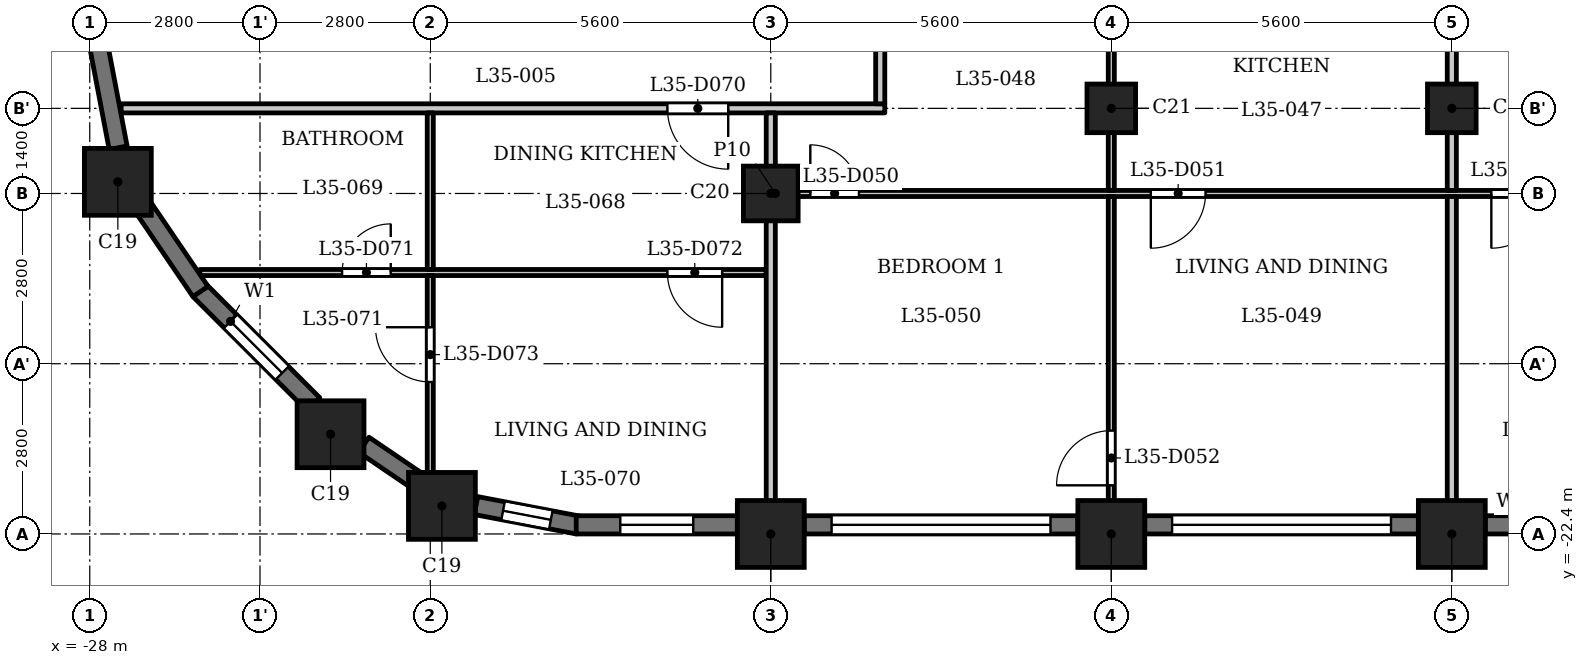
"""IFC4 building model, lengths in metres.
Left out: names, types, materials, properties, quantities, classifications, styles, units other than length and angle.
Written with IfcOpenShell. Run it as: python <this file> out.ifc"""

import sys

from ifc_helpers import new_model, si_unit, direction, frame, frame_2d, origin, origin_2d, place, context, subcontext, project, spatial, rectangle, extrude, element, fill, save


model = new_model("IFC4")
c1 = context("Model", 3, precision=1e-05, world=origin(), true_north=direction((0.0, 1.0)))
c2 = subcontext(c1, "Body", "Model", "MODEL_VIEW")
j1 = project(units=[si_unit("LENGTHUNIT", "METRE"), si_unit("PLANEANGLEUNIT", "RADIAN")], contexts=[c1])
p1 = place(None, origin())
s1 = spatial("IfcSite", under=j1, at=p1, CompositionType="ELEMENT")
p2 = place(p1, origin())
s2 = spatial("IfcBuilding", under=s1, at=p2, CompositionType="ELEMENT")
p3 = place(p2, frame((0.0, 0.0, 139.6)))
s3 = spatial("IfcBuildingStorey", under=s2, at=p3, CompositionType="ELEMENT", Elevation=139.6)
for number, where, z_axis, x_axis in (
    (1, (-22.209, -21.938, 0.0), (0.0, 0.0, 1.0), (1.0, 0.0, 0.0)),
    (2, (-16.8, -22.4, 0.0), (0.0, 0.0, 1.0), (1.0, 0.0, 0.0)),
    (3, (-11.2, -22.4, 0.0), (0.0, 0.0, 1.0), (1.0, 0.0, 0.0)),
    (4, (-5.6, -22.4, 0.0), (0.0, 0.0, 1.0), (1.0, 0.0, 0.0)),
    (5, (-27.538, -16.609, 0.0), (0.0, 0.0, 1.0), (1.0, 0.0, 0.0)),
    (6, (-24.04, -20.76, 0.0), (0.0, 0.0, 1.0), (1.0, 0.0, 0.0)),
):
    element("IfcColumn", number, at=place(p3, frame(where, z_axis=z_axis, x_axis=x_axis)), inside=s3, PredefinedType="COLUMN", context=c2, shape_type="SweptSolid", body=[
        extrude(rectangle(XDim=1.1, YDim=1.1, at=origin_2d()), origin(), (0.0, 0.0, 1.0), 3.5),
    ])
p4 = place(p3, frame((-16.8, -16.8, 0.0), z_axis=(0.0, 0.0, 1.0), x_axis=(1.0, 0.0, 0.0)))
e7 = element("IfcColumn", 7, at=p4, inside=s3, PredefinedType="COLUMN", context=c2, shape_type="SweptSolid", body=[
    extrude(rectangle(XDim=0.9, YDim=0.9, at=origin_2d()), origin(), (0.0, 0.0, 1.0), 3.5),
])
for number, where, z_axis, x_axis in (
    (8, (-11.2, -15.4, 0.0), (0.0, 0.0, 1.0), (1.0, 0.0, 0.0)),
    (9, (-5.6, -15.4, 0.0), (0.0, 0.0, 1.0), (1.0, 0.0, 0.0)),
):
    element("IfcColumn", number, at=place(p3, frame(where, z_axis=z_axis, x_axis=x_axis)), inside=s3, PredefinedType="COLUMN", context=c2, shape_type="SweptSolid", body=[
        extrude(rectangle(XDim=0.8, YDim=0.8, at=origin_2d()), origin(), (0.0, 0.0, 1.0), 3.5),
    ])
p5 = place(p3, frame((-26.197, -18.391, 0.0), z_axis=(0.0, 0.0, 1.0), x_axis=(0.707060717099, -0.707152842274, 0.0)))
e10 = element("IfcWall", 10, at=p5, inside=s3, PredefinedType="SOLIDWALL", context=c2, shape_type="SweptSolid", body=[
    extrude(rectangle(XDim=2.65, YDim=0.3, at=frame_2d((1.325, 0.0))), origin(), (0.0, 0.0, 1.0), 2.45),
])
p6 = place(p5, frame((0.725, 0.0, 0.6)))
e11 = element("IfcOpeningElement", 11, at=p6, cuts=e10, PredefinedType="OPENING", context=c2, shape_type="SweptSolid", body=[
    extrude(rectangle(XDim=1.2, YDim=1.55, at=frame_2d((0.6, 0.775))), frame((0.0, 0.16, 0.0), z_axis=(0.0, -1.0, 0.0), x_axis=(1.0, 0.0, 0.0)), (0.0, 0.0, 1.0), 0.32),
])
p7 = place(p3, frame((-23.492, -20.932, 0.0), z_axis=(0.0, 0.0, 1.0), x_axis=(0.826993959827, -0.562210806023, 0.0)))
e12 = element("IfcWall", 12, at=p7, inside=s3, PredefinedType="SOLIDWALL", context=c2, shape_type="SweptSolid", body=[
    extrude(rectangle(XDim=1.077, YDim=0.3, at=frame_2d((0.539, 0.0))), origin(), (0.0, 0.0, 1.0), 3.2),
])
p8 = place(p3, frame((-21.648, -21.933, 0.0), z_axis=(0.0, 0.0, 1.0), x_axis=(0.982297206936, -0.187329114784, 0.0)))
e13 = element("IfcWall", 13, at=p8, inside=s3, PredefinedType="SOLIDWALL", context=c2, shape_type="SweptSolid", body=[
    extrude(rectangle(XDim=1.706, YDim=0.3, at=frame_2d((0.853, 0.0))), origin(), (0.0, 0.0, 1.0), 2.45),
])
p9 = place(p8, frame((0.453, 0.0, 0.6)))
e14 = element("IfcOpeningElement", 14, at=p9, cuts=e13, PredefinedType="OPENING", context=c2, shape_type="SweptSolid", body=[
    extrude(rectangle(XDim=0.8, YDim=1.55, at=frame_2d((0.4, 0.775))), frame((0.0, 0.16, 0.0), z_axis=(0.0, -1.0, 0.0), x_axis=(1.0, 0.0, 0.0)), (0.0, 0.0, 1.0), 0.32),
])
p10 = place(p3, frame((-20.0, -22.25, 0.0), z_axis=(0.0, 0.0, 1.0), x_axis=(1.0, 0.0, 0.0)))
e15 = element("IfcWall", 15, at=p10, inside=s3, PredefinedType="SOLIDWALL", context=c2, shape_type="SweptSolid", body=[
    extrude(rectangle(XDim=2.65, YDim=0.3, at=frame_2d((1.325, 0.0))), origin(), (0.0, 0.0, 1.0), 2.45),
])
p11 = place(p10, frame((0.725, 0.0, 0.6)))
e16 = element("IfcOpeningElement", 16, at=p11, cuts=e15, PredefinedType="OPENING", context=c2, shape_type="SweptSolid", body=[
    extrude(rectangle(XDim=1.2, YDim=1.55, at=frame_2d((0.6, 0.775))), frame((0.0, 0.16, 0.0), z_axis=(0.0, -1.0, 0.0), x_axis=(1.0, 0.0, 0.0)), (0.0, 0.0, 1.0), 0.32),
])
p12 = place(p3, frame((-16.25, -22.25, 0.0), z_axis=(0.0, 0.0, 1.0), x_axis=(1.0, 0.0, 0.0)))
e17 = element("IfcWall", 17, at=p12, inside=s3, PredefinedType="SOLIDWALL", context=c2, shape_type="SweptSolid", body=[
    extrude(rectangle(XDim=4.5, YDim=0.3, at=frame_2d((2.25, 0.0))), origin(), (0.0, 0.0, 1.0), 2.45),
])
p13 = place(p12, frame((0.45, 0.0, 1.2)))
e18 = element("IfcOpeningElement", 18, at=p13, cuts=e17, PredefinedType="OPENING", context=c2, shape_type="SweptSolid", body=[
    extrude(rectangle(XDim=3.6, YDim=0.95, at=frame_2d((1.8, 0.475))), frame((0.0, 0.16, 0.0), z_axis=(0.0, -1.0, 0.0), x_axis=(1.0, 0.0, 0.0)), (0.0, 0.0, 1.0), 0.32),
])
p14 = place(p3, frame((-10.65, -22.25, 0.0), z_axis=(0.0, 0.0, 1.0), x_axis=(1.0, 0.0, 0.0)))
e19 = element("IfcWall", 19, at=p14, inside=s3, PredefinedType="SOLIDWALL", context=c2, shape_type="SweptSolid", body=[
    extrude(rectangle(XDim=4.5, YDim=0.3, at=frame_2d((2.25, 0.0))), origin(), (0.0, 0.0, 1.0), 2.45),
])
p15 = place(p14, frame((0.45, 0.0, 1.2)))
e20 = element("IfcOpeningElement", 20, at=p15, cuts=e19, PredefinedType="OPENING", context=c2, shape_type="SweptSolid", body=[
    extrude(rectangle(XDim=3.6, YDim=0.95, at=frame_2d((1.8, 0.475))), frame((0.0, 0.16, 0.0), z_axis=(0.0, -1.0, 0.0), x_axis=(1.0, 0.0, 0.0)), (0.0, 0.0, 1.0), 0.32),
])
p16 = place(p3, frame((-5.05, -22.25, 0.0), z_axis=(0.0, 0.0, 1.0), x_axis=(1.0, 0.0, 0.0)))
e21 = element("IfcWall", 21, at=p16, inside=s3, PredefinedType="SOLIDWALL", context=c2, shape_type="SweptSolid", body=[
    extrude(rectangle(XDim=4.5, YDim=0.3, at=frame_2d((2.25, 0.0))), origin(), (0.0, 0.0, 1.0), 2.45),
])
p17 = place(p16, frame((0.45, 0.0, 1.2)))
e22 = element("IfcOpeningElement", 22, at=p17, cuts=e21, PredefinedType="OPENING", context=c2, shape_type="SweptSolid", body=[
    extrude(rectangle(XDim=3.6, YDim=0.95, at=frame_2d((1.8, 0.475))), frame((0.0, 0.16, 0.0), z_axis=(0.0, -1.0, 0.0), x_axis=(1.0, 0.0, 0.0)), (0.0, 0.0, 1.0), 0.32),
])
p18 = place(p3, frame((-27.853, -14.372, 0.0), z_axis=(0.0, 0.0, 1.0), x_axis=(0.187302784601, -0.982302227871, 0.0)))
e23 = element("IfcWall", 23, at=p18, inside=s3, PredefinedType="SOLIDWALL", context=c2, shape_type="SweptSolid", body=[
    extrude(rectangle(XDim=1.706, YDim=0.3, at=frame_2d((0.853, 0.0))), origin(), (0.0, 0.0, 1.0), 2.45),
])
p19 = place(p3, frame((-27.138, -17.002, 0.0), z_axis=(0.0, 0.0, 1.0), x_axis=(0.562075160946, -0.827086158419, 0.0)))
e24 = element("IfcWall", 24, at=p19, inside=s3, PredefinedType="SOLIDWALL", context=c2, shape_type="SweptSolid", body=[
    extrude(rectangle(XDim=1.706, YDim=0.3, at=frame_2d((0.853, 0.0))), origin(), (0.0, 0.0, 1.0), 2.45),
])
p20 = place(p3, frame((-26.19, -18.1, 0.0), z_axis=(0.0, 0.0, 1.0), x_axis=(1.0, 0.0, 0.0)))
e25 = element("IfcWall", 25, at=p20, inside=s3, PredefinedType="PARTITIONING", context=c2, shape_type="SweptSolid", body=[
    extrude(rectangle(XDim=9.315, YDim=0.1, at=frame_2d((4.658, 0.0))), origin(), (0.0, 0.0, 1.0), 3.2),
])
p21 = place(p20, frame((2.34, 0.0, 0.0)))
e26 = element("IfcOpeningElement", 26, at=p21, cuts=e25, PredefinedType="OPENING", context=c2, shape_type="SweptSolid", body=[
    extrude(rectangle(XDim=0.8, YDim=2.1, at=frame_2d((0.4, 1.05))), frame((0.0, 0.06, 0.0), z_axis=(0.0, -1.0, 0.0), x_axis=(1.0, 0.0, 0.0)), (0.0, 0.0, 1.0), 0.12),
])
p22 = place(p20, frame((7.69, 0.0, 0.0)))
e27 = element("IfcOpeningElement", 27, at=p22, cuts=e25, PredefinedType="OPENING", context=c2, shape_type="SweptSolid", body=[
    extrude(rectangle(XDim=0.9, YDim=2.1, at=frame_2d((0.45, 1.05))), frame((0.0, 0.06, 0.0), z_axis=(0.0, -1.0, 0.0), x_axis=(1.0, 0.0, 0.0)), (0.0, 0.0, 1.0), 0.12),
])
p23 = place(p3, frame((-16.725, -16.8, 0.0), z_axis=(0.0, 0.0, 1.0), x_axis=(1.0, 0.0, 0.0)))
e28 = element("IfcWall", 28, at=p23, inside=s3, PredefinedType="PARTITIONING", context=c2, shape_type="SweptSolid", body=[
    extrude(rectangle(XDim=33.45, YDim=0.1, at=frame_2d((16.725, 0.0))), origin(), (0.0, 0.0, 1.0), 3.2),
])
p24 = place(p23, frame((0.575, 0.0, 0.0)))
e29 = element("IfcOpeningElement", 29, at=p24, cuts=e28, PredefinedType="OPENING", context=c2, shape_type="SweptSolid", body=[
    extrude(rectangle(XDim=0.8, YDim=2.1, at=frame_2d((0.4, 1.05))), frame((0.0, 0.06, 0.0), z_axis=(0.0, -1.0, 0.0), x_axis=(1.0, 0.0, 0.0)), (0.0, 0.0, 1.0), 0.12),
])
p25 = place(p23, frame((6.175, 0.0, 0.0)))
e30 = element("IfcOpeningElement", 30, at=p25, cuts=e28, PredefinedType="OPENING", context=c2, shape_type="SweptSolid", body=[
    extrude(rectangle(XDim=0.9, YDim=2.1, at=frame_2d((0.45, 1.05))), frame((0.0, 0.06, 0.0), z_axis=(0.0, -1.0, 0.0), x_axis=(1.0, 0.0, 0.0)), (0.0, 0.0, 1.0), 0.12),
])
p26 = place(p23, frame((15.275, 0.0, 0.0)))
e31 = element("IfcOpeningElement", 31, at=p26, cuts=e28, PredefinedType="OPENING", context=c2, shape_type="SweptSolid", body=[
    extrude(rectangle(XDim=0.8, YDim=2.1, at=frame_2d((0.4, 1.05))), frame((0.0, 0.06, 0.0), z_axis=(0.0, -1.0, 0.0), x_axis=(1.0, 0.0, 0.0)), (0.0, 0.0, 1.0), 0.12),
])
p27 = place(p23, frame((11.775, 0.0, 0.0)))
e32 = element("IfcOpeningElement", 32, at=p27, cuts=e28, PredefinedType="OPENING", context=c2, shape_type="SweptSolid", body=[
    extrude(rectangle(XDim=0.9, YDim=2.1, at=frame_2d((0.45, 1.05))), frame((0.0, 0.06, 0.0), z_axis=(0.0, -1.0, 0.0), x_axis=(1.0, 0.0, 0.0)), (0.0, 0.0, 1.0), 0.12),
])
p28 = place(p23, frame((17.275, 0.0, 0.0)))
e33 = element("IfcOpeningElement", 33, at=p28, cuts=e28, PredefinedType="OPENING", context=c2, shape_type="SweptSolid", body=[
    extrude(rectangle(XDim=0.8, YDim=2.1, at=frame_2d((0.4, 1.05))), frame((0.0, 0.06, 0.0), z_axis=(0.0, -1.0, 0.0), x_axis=(1.0, 0.0, 0.0)), (0.0, 0.0, 1.0), 0.12),
])
p29 = place(p23, frame((20.775, 0.0, 0.0)))
e34 = element("IfcOpeningElement", 34, at=p29, cuts=e28, PredefinedType="OPENING", context=c2, shape_type="SweptSolid", body=[
    extrude(rectangle(XDim=0.9, YDim=2.1, at=frame_2d((0.45, 1.05))), frame((0.0, 0.06, 0.0), z_axis=(0.0, -1.0, 0.0), x_axis=(1.0, 0.0, 0.0)), (0.0, 0.0, 1.0), 0.12),
])
p30 = place(p23, frame((31.575, 0.0, 0.0)))
e35 = element("IfcOpeningElement", 35, at=p30, cuts=e28, PredefinedType="OPENING", context=c2, shape_type="SweptSolid", body=[
    extrude(rectangle(XDim=0.8, YDim=2.1, at=frame_2d((0.4, 1.05))), frame((0.0, 0.06, 0.0), z_axis=(0.0, -1.0, 0.0), x_axis=(1.0, 0.0, 0.0)), (0.0, 0.0, 1.0), 0.12),
])
p31 = place(p23, frame((28.575, 0.0, 0.0)))
e36 = element("IfcOpeningElement", 36, at=p31, cuts=e28, PredefinedType="OPENING", context=c2, shape_type="SweptSolid", body=[
    extrude(rectangle(XDim=0.9, YDim=2.1, at=frame_2d((0.45, 1.05))), frame((0.0, 0.06, 0.0), z_axis=(0.0, -1.0, 0.0), x_axis=(1.0, 0.0, 0.0)), (0.0, 0.0, 1.0), 0.12),
])
p32 = place(p23, frame((23.725, 0.0, 0.0)))
e37 = element("IfcOpeningElement", 37, at=p32, cuts=e28, PredefinedType="OPENING", context=c2, shape_type="SweptSolid", body=[
    extrude(rectangle(XDim=0.9, YDim=2.1, at=frame_2d((0.45, 1.05))), frame((0.0, 0.06, 0.0), z_axis=(0.0, -1.0, 0.0), x_axis=(1.0, 0.0, 0.0)), (0.0, 0.0, 1.0), 0.12),
])
p33 = place(p23, frame((26.225, 0.0, 0.0)))
e38 = element("IfcOpeningElement", 38, at=p33, cuts=e28, PredefinedType="OPENING", context=c2, shape_type="SweptSolid", body=[
    extrude(rectangle(XDim=0.9, YDim=2.1, at=frame_2d((0.45, 1.05))), frame((0.0, 0.06, 0.0), z_axis=(0.0, -1.0, 0.0), x_axis=(1.0, 0.0, 0.0)), (0.0, 0.0, 1.0), 0.12),
])
p34 = place(p3, frame((-27.484, -15.4, 0.0), z_axis=(0.0, 0.0, 1.0), x_axis=(1.0, 0.0, 0.0)))
e39 = element("IfcWall", 39, at=p34, inside=s3, PredefinedType="PARTITIONING", context=c2, shape_type="SweptSolid", body=[
    extrude(rectangle(XDim=12.559, YDim=0.15, at=frame_2d((6.279, 0.0))), origin(), (0.0, 0.0, 1.0), 3.2),
])
p35 = place(p34, frame((8.984, 0.0, 0.0)))
e40 = element("IfcOpeningElement", 40, at=p35, cuts=e39, PredefinedType="OPENING", context=c2, shape_type="SweptSolid", body=[
    extrude(rectangle(XDim=1.0, YDim=2.1, at=frame_2d((0.5, 1.05))), frame((0.0, 0.085, 0.0), z_axis=(0.0, -1.0, 0.0), x_axis=(1.0, 0.0, 0.0)), (0.0, 0.0, 1.0), 0.17),
])
p36 = place(p3, frame((-22.4, -21.72, 0.0), z_axis=(0.0, 0.0, 1.0), x_axis=(0.0, 1.0, 0.0)))
e41 = element("IfcWall", 41, at=p36, inside=s3, PredefinedType="PARTITIONING", context=c2, shape_type="SweptSolid", body=[
    extrude(rectangle(XDim=3.57, YDim=0.1, at=frame_2d((1.785, 0.0))), origin(), (0.0, 0.0, 1.0), 3.2),
])
p37 = place(p36, frame((1.82, 0.0, 0.0)))
e42 = element("IfcOpeningElement", 42, at=p37, cuts=e41, PredefinedType="OPENING", context=c2, shape_type="SweptSolid", body=[
    extrude(rectangle(XDim=0.9, YDim=2.1, at=frame_2d((0.45, 1.05))), frame((0.0, 0.06, 0.0), z_axis=(0.0, -1.0, 0.0), x_axis=(1.0, 0.0, 0.0)), (0.0, 0.0, 1.0), 0.12),
])
p38 = place(p3, frame((-22.4, -18.05, 0.0), z_axis=(0.0, 0.0, 1.0), x_axis=(0.0, 1.0, 0.0)))
e43 = element("IfcWall", 43, at=p38, inside=s3, PredefinedType="PARTITIONING", context=c2, shape_type="SweptSolid", body=[
    extrude(rectangle(XDim=2.575, YDim=0.1, at=frame_2d((1.288, 0.0))), origin(), (0.0, 0.0, 1.0), 3.2),
])
p39 = place(p3, frame((-16.8, -22.93, 0.0), z_axis=(0.0, 0.0, 1.0), x_axis=(0.0, 1.0, 0.0)))
e44 = element("IfcWall", 44, at=p39, inside=s3, PredefinedType="PARTITIONING", context=c2, shape_type="SweptSolid", body=[
    extrude(rectangle(XDim=7.455, YDim=0.15, at=frame_2d((3.728, 0.0))), origin(), (0.0, 0.0, 1.0), 3.2),
])
p40 = place(p3, frame((-15.0, -15.325, 0.0), z_axis=(0.0, 0.0, 1.0), x_axis=(0.0, 1.0, 0.0)))
e45 = element("IfcWall", 45, at=p40, inside=s3, PredefinedType="PARTITIONING", context=c2, shape_type="SweptSolid", body=[
    extrude(rectangle(XDim=2.05, YDim=0.15, at=frame_2d((1.025, 0.0))), origin(), (0.0, 0.0, 1.0), 3.2),
])
p41 = place(p3, frame((-11.2, -22.93, 0.0), z_axis=(0.0, 0.0, 1.0), x_axis=(0.0, 1.0, 0.0)))
e46 = element("IfcWall", 46, at=p41, inside=s3, PredefinedType="PARTITIONING", context=c2, shape_type="SweptSolid", body=[
    extrude(rectangle(XDim=6.08, YDim=0.1, at=frame_2d((3.04, 0.0))), origin(), (0.0, 0.0, 1.0), 3.2),
])
p42 = place(p41, frame((1.33, 0.0, 0.0)))
e47 = element("IfcOpeningElement", 47, at=p42, cuts=e46, PredefinedType="OPENING", context=c2, shape_type="SweptSolid", body=[
    extrude(rectangle(XDim=0.9, YDim=2.1, at=frame_2d((0.45, 1.05))), frame((0.0, 0.06, 0.0), z_axis=(0.0, -1.0, 0.0), x_axis=(1.0, 0.0, 0.0)), (0.0, 0.0, 1.0), 0.12),
])
p43 = place(p3, frame((-11.2, -16.75, 0.0), z_axis=(0.0, 0.0, 1.0), x_axis=(0.0, 1.0, 0.0)))
e48 = element("IfcWall", 48, at=p43, inside=s3, PredefinedType="PARTITIONING", context=c2, shape_type="SweptSolid", body=[
    extrude(rectangle(XDim=3.475, YDim=0.1, at=frame_2d((1.738, 0.0))), origin(), (0.0, 0.0, 1.0), 3.2),
])
p44 = place(p3, frame((-5.6, -22.93, 0.0), z_axis=(0.0, 0.0, 1.0), x_axis=(0.0, 1.0, 0.0)))
e49 = element("IfcWall", 49, at=p44, inside=s3, PredefinedType="PARTITIONING", context=c2, shape_type="SweptSolid", body=[
    extrude(rectangle(XDim=6.08, YDim=0.15, at=frame_2d((3.04, 0.0))), origin(), (0.0, 0.0, 1.0), 3.2),
])
p45 = place(p3, frame((-5.6, -16.75, 0.0), z_axis=(0.0, 0.0, 1.0), x_axis=(0.0, 1.0, 0.0)))
e50 = element("IfcWall", 50, at=p45, inside=s3, PredefinedType="PARTITIONING", context=c2, shape_type="SweptSolid", body=[
    extrude(rectangle(XDim=3.475, YDim=0.15, at=frame_2d((1.738, 0.0))), origin(), (0.0, 0.0, 1.0), 3.2),
])
p46 = place(p24, origin())
e51 = element("IfcDoor", 51, at=p46, inside=s3, OperationType="SINGLE_SWING_RIGHT", PredefinedType="DOOR", context=c2, shape_type="SweptSolid", body=[
    extrude(rectangle(XDim=0.8, YDim=2.1, at=frame_2d((0.4, 1.05))), frame((0.0, 0.025, 0.0), z_axis=(0.0, -1.0, 0.0), x_axis=(1.0, 0.0, 0.0)), (0.0, 0.0, 1.0), 0.05),
])
fill(e29, e51)
p47 = place(p25, origin())
e52 = element("IfcDoor", 52, at=p47, inside=s3, OperationType="SINGLE_SWING_LEFT", PredefinedType="DOOR", context=c2, shape_type="SweptSolid", body=[
    extrude(rectangle(XDim=0.9, YDim=2.1, at=frame_2d((0.45, 1.05))), frame((0.0, 0.025, 0.0), z_axis=(0.0, -1.0, 0.0), x_axis=(1.0, 0.0, 0.0)), (0.0, 0.0, 1.0), 0.05),
])
fill(e30, e52)
p48 = place(p42, origin())
e53 = element("IfcDoor", 53, at=p48, inside=s3, OperationType="SINGLE_SWING_RIGHT", PredefinedType="DOOR", context=c2, shape_type="SweptSolid", body=[
    extrude(rectangle(XDim=0.9, YDim=2.1, at=frame_2d((0.45, 1.05))), frame((0.0, 0.025, 0.0), z_axis=(0.0, -1.0, 0.0), x_axis=(1.0, 0.0, 0.0)), (0.0, 0.0, 1.0), 0.05),
])
fill(e47, e53)
p49 = place(p27, origin())
e54 = element("IfcDoor", 54, at=p49, inside=s3, OperationType="SINGLE_SWING_LEFT", PredefinedType="DOOR", context=c2, shape_type="SweptSolid", body=[
    extrude(rectangle(XDim=0.9, YDim=2.1, at=frame_2d((0.45, 1.05))), frame((0.0, 0.025, 0.0), z_axis=(0.0, -1.0, 0.0), x_axis=(1.0, 0.0, 0.0)), (0.0, 0.0, 1.0), 0.05),
])
fill(e32, e54)
p50 = place(p35, origin())
e55 = element("IfcDoor", 55, at=p50, inside=s3, OperationType="SINGLE_SWING_RIGHT", PredefinedType="DOOR", context=c2, shape_type="SweptSolid", body=[
    extrude(rectangle(XDim=1.0, YDim=2.1, at=frame_2d((0.5, 1.05))), frame((0.0, 0.025, 0.0), z_axis=(0.0, -1.0, 0.0), x_axis=(1.0, 0.0, 0.0)), (0.0, 0.0, 1.0), 0.05),
])
fill(e40, e55)
p51 = place(p21, origin())
e56 = element("IfcDoor", 56, at=p51, inside=s3, OperationType="SINGLE_SWING_LEFT", PredefinedType="DOOR", context=c2, shape_type="SweptSolid", body=[
    extrude(rectangle(XDim=0.8, YDim=2.1, at=frame_2d((0.4, 1.05))), frame((0.0, 0.025, 0.0), z_axis=(0.0, -1.0, 0.0), x_axis=(1.0, 0.0, 0.0)), (0.0, 0.0, 1.0), 0.05),
])
fill(e26, e56)
p52 = place(p22, origin())
e57 = element("IfcDoor", 57, at=p52, inside=s3, OperationType="SINGLE_SWING_RIGHT", PredefinedType="DOOR", context=c2, shape_type="SweptSolid", body=[
    extrude(rectangle(XDim=0.9, YDim=2.1, at=frame_2d((0.45, 1.05))), frame((0.0, 0.025, 0.0), z_axis=(0.0, -1.0, 0.0), x_axis=(1.0, 0.0, 0.0)), (0.0, 0.0, 1.0), 0.05),
])
fill(e27, e57)
p53 = place(p37, origin())
e58 = element("IfcDoor", 58, at=p53, inside=s3, OperationType="SINGLE_SWING_LEFT", PredefinedType="DOOR", context=c2, shape_type="SweptSolid", body=[
    extrude(rectangle(XDim=0.9, YDim=2.1, at=frame_2d((0.45, 1.05))), frame((0.0, 0.025, 0.0), z_axis=(0.0, -1.0, 0.0), x_axis=(1.0, 0.0, 0.0)), (0.0, 0.0, 1.0), 0.05),
])
fill(e42, e58)
p54 = place(p6, origin())
e59 = element("IfcWindow", 59, at=p54, inside=s3, PartitioningType="SINGLE_PANEL", PredefinedType="WINDOW", context=c2, shape_type="SweptSolid", body=[
    extrude(rectangle(XDim=1.2, YDim=1.55, at=frame_2d((0.6, 0.775))), frame((0.0, 0.03, 0.0), z_axis=(0.0, -1.0, 0.0), x_axis=(1.0, 0.0, 0.0)), (0.0, 0.0, 1.0), 0.06),
])
fill(e11, e59)
p55 = place(p9, origin())
e60 = element("IfcWindow", 60, at=p55, inside=s3, PartitioningType="SINGLE_PANEL", PredefinedType="WINDOW", context=c2, shape_type="SweptSolid", body=[
    extrude(rectangle(XDim=0.8, YDim=1.55, at=frame_2d((0.4, 0.775))), frame((0.0, 0.03, 0.0), z_axis=(0.0, -1.0, 0.0), x_axis=(1.0, 0.0, 0.0)), (0.0, 0.0, 1.0), 0.06),
])
fill(e14, e60)
p56 = place(p11, origin())
e61 = element("IfcWindow", 61, at=p56, inside=s3, PartitioningType="SINGLE_PANEL", PredefinedType="WINDOW", context=c2, shape_type="SweptSolid", body=[
    extrude(rectangle(XDim=1.2, YDim=1.55, at=frame_2d((0.6, 0.775))), frame((0.0, 0.03, 0.0), z_axis=(0.0, -1.0, 0.0), x_axis=(1.0, 0.0, 0.0)), (0.0, 0.0, 1.0), 0.06),
])
fill(e16, e61)
p57 = place(p13, origin())
e62 = element("IfcWindow", 62, at=p57, inside=s3, PartitioningType="SINGLE_PANEL", PredefinedType="WINDOW", context=c2, shape_type="SweptSolid", body=[
    extrude(rectangle(XDim=3.6, YDim=0.95, at=frame_2d((1.8, 0.475))), frame((0.0, 0.03, 0.0), z_axis=(0.0, -1.0, 0.0), x_axis=(1.0, 0.0, 0.0)), (0.0, 0.0, 1.0), 0.06),
])
fill(e18, e62)
p58 = place(p15, origin())
e63 = element("IfcWindow", 63, at=p58, inside=s3, PartitioningType="SINGLE_PANEL", PredefinedType="WINDOW", context=c2, shape_type="SweptSolid", body=[
    extrude(rectangle(XDim=3.6, YDim=0.95, at=frame_2d((1.8, 0.475))), frame((0.0, 0.03, 0.0), z_axis=(0.0, -1.0, 0.0), x_axis=(1.0, 0.0, 0.0)), (0.0, 0.0, 1.0), 0.06),
])
fill(e20, e63)
save(model, sys.argv[1])
